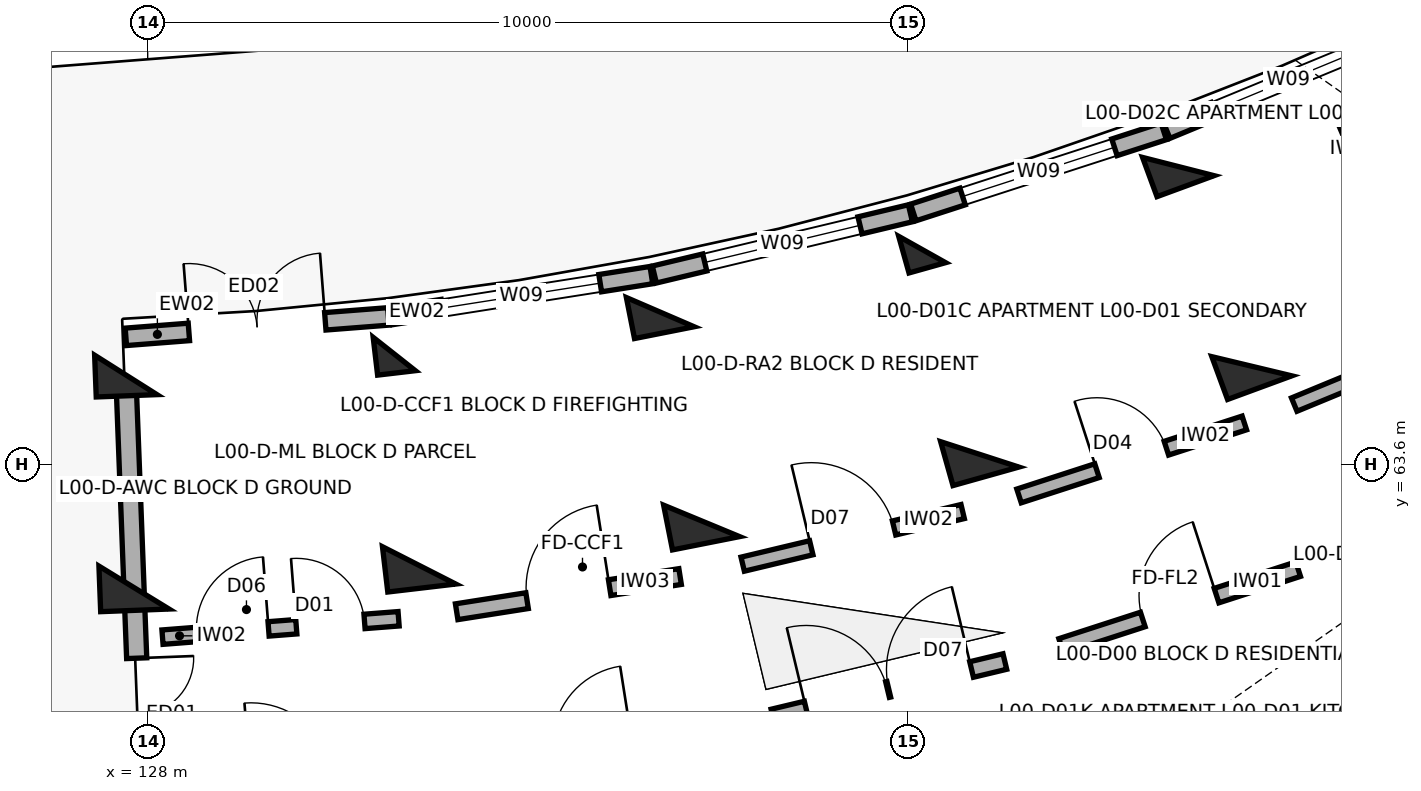
"""IFC4 building model, lengths in metres.
Left out: names, types, materials, properties, quantities, classifications, styles, units other than length and angle.
Written with IfcOpenShell. Run it as: python <this file> out.ifc"""

import sys

from ifc_helpers import new_model, si_unit, direction, frame, frame_2d, origin, origin_2d, place, context, subcontext, project, spatial, rectangle, extrude, element, fill, save


model = new_model("IFC4")
c1 = context("Model", 3, precision=1e-05, world=origin(), true_north=direction((0.0, 1.0)))
c2 = subcontext(c1, "Body", "Model", "MODEL_VIEW")
j1 = project(units=[si_unit("LENGTHUNIT", "METRE"), si_unit("PLANEANGLEUNIT", "RADIAN")], contexts=[c1])
p1 = place(None, origin())
s1 = spatial("IfcSite", under=j1, at=p1, CompositionType="ELEMENT")
p2 = place(p1, origin())
s2 = spatial("IfcBuilding", under=s1, at=p2, CompositionType="ELEMENT")
p3 = place(p2, origin())
s3 = spatial("IfcBuildingStorey", under=s2, at=p3, CompositionType="ELEMENT", Elevation=0.0)
p4 = place(p3, frame((127.712, 64.773, 0.0), z_axis=(0.0, 0.0, 1.0), x_axis=(0.038387809088, -0.999262916411, 0.0)))
e1 = element("IfcColumn", 1, at=p4, inside=s3, PredefinedType="COLUMN", context=c2, shape_type="SweptSolid", body=[
    extrude(rectangle(XDim=0.55, YDim=0.8, at=origin_2d()), origin(), (0.0, 0.0, 1.0), 4.5),
])
p5 = place(p3, frame((127.82, 61.975, 0.0), z_axis=(0.0, 0.0, 1.0), x_axis=(0.038387809088, -0.999262916411, 0.0)))
e2 = element("IfcColumn", 2, at=p5, inside=s3, PredefinedType="COLUMN", context=c2, shape_type="SweptSolid", body=[
    extrude(rectangle(XDim=0.6, YDim=0.9, at=origin_2d()), origin(), (0.0, 0.0, 1.0), 4.5),
])
p6 = place(p3, frame((131.244, 65.048, 0.0), z_axis=(0.0, 0.0, 1.0), x_axis=(0.116670737099, -0.993170649538, 0.0)))
e3 = element("IfcColumn", 3, at=p6, inside=s3, PredefinedType="COLUMN", context=c2, shape_type="SweptSolid", body=[
    extrude(rectangle(XDim=0.5, YDim=0.5, at=origin_2d()), origin(), (0.0, 0.0, 1.0), 4.5),
])
p7 = place(p3, frame((131.571, 62.267, 0.0), z_axis=(0.0, 0.0, 1.0), x_axis=(0.116670737099, -0.993170649538, 0.0)))
e4 = element("IfcColumn", 4, at=p7, inside=s3, PredefinedType="COLUMN", context=c2, shape_type="SweptSolid", body=[
    extrude(rectangle(XDim=0.6, YDim=0.9, at=origin_2d()), origin(), (0.0, 0.0, 1.0), 4.5),
])
p8 = place(p3, frame((134.744, 65.599, 0.0), z_axis=(0.0, 0.0, 1.0), x_axis=(0.19423435122, -0.980955155349, 0.0)))
e5 = element("IfcColumn", 5, at=p8, inside=s3, PredefinedType="COLUMN", context=c2, shape_type="SweptSolid", body=[
    extrude(rectangle(XDim=0.55, YDim=0.8, at=origin_2d()), origin(), (0.0, 0.0, 1.0), 4.5),
])
p9 = place(p3, frame((135.288, 62.853, 0.0), z_axis=(0.0, 0.0, 1.0), x_axis=(0.19423435122, -0.980955155349, 0.0)))
e6 = element("IfcColumn", 6, at=p9, inside=s3, PredefinedType="COLUMN", context=c2, shape_type="SweptSolid", body=[
    extrude(rectangle(XDim=0.6, YDim=0.9, at=origin_2d()), origin(), (0.0, 0.0, 1.0), 4.5),
])
p10 = place(p3, frame((138.189, 66.423, 0.0), z_axis=(0.0, 0.0, 1.0), x_axis=(0.270600445976, -0.962691746426, 0.0)))
e7 = element("IfcColumn", 7, at=p10, inside=s3, PredefinedType="COLUMN", context=c2, shape_type="SweptSolid", body=[
    extrude(rectangle(XDim=0.5, YDim=0.5, at=origin_2d()), origin(), (0.0, 0.0, 1.0), 4.5),
])
p11 = place(p3, frame((138.947, 63.728, 0.0), z_axis=(0.0, 0.0, 1.0), x_axis=(0.270600445976, -0.962691746426, 0.0)))
e8 = element("IfcColumn", 8, at=p11, inside=s3, PredefinedType="COLUMN", context=c2, shape_type="SweptSolid", body=[
    extrude(rectangle(XDim=0.6, YDim=0.9, at=origin_2d()), origin(), (0.0, 0.0, 1.0), 4.5),
])
p12 = place(p3, frame((141.56, 67.515, 0.0), z_axis=(0.0, 0.0, 1.0), x_axis=(0.345298198999, -0.93849302276, 0.0)))
e9 = element("IfcColumn", 9, at=p12, inside=s3, PredefinedType="COLUMN", context=c2, shape_type="SweptSolid", body=[
    extrude(rectangle(XDim=0.55, YDim=0.8, at=origin_2d()), origin(), (0.0, 0.0, 1.0), 4.5),
])
p13 = place(p3, frame((142.527, 64.887, 0.0), z_axis=(0.0, 0.0, 1.0), x_axis=(0.345298198999, -0.93849302276, 0.0)))
e10 = element("IfcColumn", 10, at=p13, inside=s3, PredefinedType="COLUMN", context=c2, shape_type="SweptSolid", body=[
    extrude(rectangle(XDim=0.6, YDim=0.9, at=origin_2d()), origin(), (0.0, 0.0, 1.0), 4.5),
])
p14 = place(p3, frame((127.713, 65.274, 0.0), z_axis=(0.0, 0.0, 1.0), x_axis=(0.99698399587, 0.07760742219, 0.0)))
e11 = element("IfcWall", 11, at=p14, inside=s3, PredefinedType="SOLIDWALL", context=c2, shape_type="SweptSolid", body=[
    extrude(rectangle(XDim=3.464, YDim=0.23, at=frame_2d((1.732, 0.0))), origin(), (0.0, 0.0, 1.0), 3.45),
])
p15 = place(p14, frame((0.832, 0.0, 0.0)))
e12 = element("IfcOpeningElement", 12, at=p15, cuts=e11, PredefinedType="OPENING", context=c2, shape_type="SweptSolid", body=[
    extrude(rectangle(XDim=1.8, YDim=2.3, at=frame_2d((0.9, 1.15))), frame((0.0, 0.125, 0.0), z_axis=(0.0, -1.0, 0.0), x_axis=(1.0, 0.0, 0.0)), (0.0, 0.0, 1.0), 0.25),
])
p16 = place(p3, frame((131.206, 65.548, 0.0), z_axis=(0.0, 0.0, 1.0), x_axis=(0.987825183084, 0.155568016203, 0.0)))
e13 = element("IfcWall", 13, at=p16, inside=s3, PredefinedType="SOLIDWALL", context=c2, shape_type="SweptSolid", body=[
    extrude(rectangle(XDim=3.464, YDim=0.23, at=frame_2d((1.732, 0.0))), origin(), (0.0, 0.0, 1.0), 3.45),
])
p17 = place(p16, frame((0.682, 0.0, 0.32)))
e14 = element("IfcOpeningElement", 14, at=p17, cuts=e13, PredefinedType="OPENING", context=c2, shape_type="SweptSolid", body=[
    extrude(rectangle(XDim=2.1, YDim=1.65, at=frame_2d((1.05, 0.825))), frame((0.0, 0.125, 0.0), z_axis=(0.0, -1.0, 0.0), x_axis=(1.0, 0.0, 0.0)), (0.0, 0.0, 1.0), 0.25),
])
p18 = place(p3, frame((134.666, 66.094, 0.0), z_axis=(0.0, 0.0, 1.0), x_axis=(0.972567451803, 0.232621047398, 0.0)))
e15 = element("IfcWall", 15, at=p18, inside=s3, PredefinedType="SOLIDWALL", context=c2, shape_type="SweptSolid", body=[
    extrude(rectangle(XDim=3.463, YDim=0.23, at=frame_2d((1.732, 0.0))), origin(), (0.0, 0.0, 1.0), 3.45),
])
p19 = place(p18, frame((0.682, 0.0, 0.32)))
e16 = element("IfcOpeningElement", 16, at=p19, cuts=e15, PredefinedType="OPENING", context=c2, shape_type="SweptSolid", body=[
    extrude(rectangle(XDim=2.1, YDim=1.65, at=frame_2d((1.05, 0.825))), frame((0.0, 0.125, 0.0), z_axis=(0.0, -1.0, 0.0), x_axis=(1.0, 0.0, 0.0)), (0.0, 0.0, 1.0), 0.25),
])
p20 = place(p3, frame((138.073, 66.911, 0.0), z_axis=(0.0, 0.0, 1.0), x_axis=(0.951327869213, 0.308180604935, 0.0)))
e17 = element("IfcWall", 17, at=p20, inside=s3, PredefinedType="SOLIDWALL", context=c2, shape_type="SweptSolid", body=[
    extrude(rectangle(XDim=3.463, YDim=0.23, at=frame_2d((1.732, 0.0))), origin(), (0.0, 0.0, 1.0), 3.45),
])
p21 = place(p20, frame((0.682, 0.0, 0.32)))
e18 = element("IfcOpeningElement", 18, at=p21, cuts=e17, PredefinedType="OPENING", context=c2, shape_type="SweptSolid", body=[
    extrude(rectangle(XDim=2.1, YDim=1.65, at=frame_2d((1.05, 0.825))), frame((0.0, 0.125, 0.0), z_axis=(0.0, -1.0, 0.0), x_axis=(1.0, 0.0, 0.0)), (0.0, 0.0, 1.0), 0.25),
])
p22 = place(p3, frame((141.406, 67.992, 0.0), z_axis=(0.0, 0.0, 1.0), x_axis=(0.924221949388, 0.381855716561, 0.0)))
e19 = element("IfcWall", 19, at=p22, inside=s3, PredefinedType="SOLIDWALL", context=c2, shape_type="SweptSolid", body=[
    extrude(rectangle(XDim=3.463, YDim=0.23, at=frame_2d((1.732, 0.0))), origin(), (0.0, 0.0, 1.0), 3.45),
])
p23 = place(p22, frame((0.682, 0.0, 0.32)))
e20 = element("IfcOpeningElement", 20, at=p23, cuts=e19, PredefinedType="OPENING", context=c2, shape_type="SweptSolid", body=[
    extrude(rectangle(XDim=2.1, YDim=1.65, at=frame_2d((1.05, 0.825))), frame((0.0, 0.125, 0.0), z_axis=(0.0, -1.0, 0.0), x_axis=(1.0, 0.0, 0.0)), (0.0, 0.0, 1.0), 0.25),
])
p24 = place(p3, frame((127.721, 64.533, 0.0), z_axis=(0.0, 0.0, 1.0), x_axis=(0.038407966241, -0.999262141847, 0.0)))
e21 = element("IfcWall", 21, at=p24, inside=s3, PredefinedType="SOLIDWALL", context=c2, shape_type="SweptSolid", body=[
    extrude(rectangle(XDim=8.2, YDim=0.265, at=frame_2d((4.1, 0.0))), origin(), (0.0, 0.0, 1.0), 3.34),
])
p25 = place(p24, frame((3.49, 0.0, 0.0)))
e22 = element("IfcOpeningElement", 22, at=p25, cuts=e21, PredefinedType="OPENING", context=c2, shape_type="SweptSolid", body=[
    extrude(rectangle(XDim=1.5, YDim=2.2, at=frame_2d((0.75, 1.1))), frame((0.0, 0.142, 0.0), z_axis=(0.0, -1.0, 0.0), x_axis=(1.0, 0.0, 0.0)), (0.0, 0.0, 1.0), 0.285),
])
p26 = place(p3, frame((128.195, 61.323, 0.0), z_axis=(0.0, 0.0, 1.0), x_axis=(0.996987280187, 0.077565218655, 0.0)))
e23 = element("IfcWall", 23, at=p26, inside=s3, PredefinedType="SOLIDWALL", context=c2, shape_type="SweptSolid", body=[
    extrude(rectangle(XDim=3.116, YDim=0.19, at=frame_2d((1.558, 0.0))), origin(), (0.0, 0.0, 1.0), 3.34),
])
p27 = place(p26, frame((0.45, 0.0, 0.0)))
e24 = element("IfcOpeningElement", 24, at=p27, cuts=e23, PredefinedType="OPENING", context=c2, shape_type="SweptSolid", body=[
    extrude(rectangle(XDim=0.95, YDim=2.1, at=frame_2d((0.475, 1.05))), frame((0.0, 0.105, 0.0), z_axis=(0.0, -1.0, 0.0), x_axis=(1.0, 0.0, 0.0)), (0.0, 0.0, 1.0), 0.21),
])
p28 = place(p26, frame((1.766, 0.0, 0.0)))
e25 = element("IfcOpeningElement", 25, at=p28, cuts=e23, PredefinedType="OPENING", context=c2, shape_type="SweptSolid", body=[
    extrude(rectangle(XDim=0.9, YDim=2.1, at=frame_2d((0.45, 1.05))), frame((0.0, 0.105, 0.0), z_axis=(0.0, -1.0, 0.0), x_axis=(1.0, 0.0, 0.0)), (0.0, 0.0, 1.0), 0.21),
])
p29 = place(p3, frame((132.065, 61.657, 0.0), z_axis=(0.0, 0.0, 1.0), x_axis=(0.987816121487, 0.155625544594, 0.0)))
e26 = element("IfcWall", 26, at=p29, inside=s3, PredefinedType="SOLIDWALL", context=c2, shape_type="SweptSolid", body=[
    extrude(rectangle(XDim=2.976, YDim=0.21, at=frame_2d((1.488, 0.0))), origin(), (0.0, 0.0, 1.0), 3.34),
])
p30 = place(p29, frame((0.938, 0.0, 0.0)))
e27 = element("IfcOpeningElement", 27, at=p30, cuts=e26, PredefinedType="OPENING", context=c2, shape_type="SweptSolid", body=[
    extrude(rectangle(XDim=1.1, YDim=2.15, at=frame_2d((0.55, 1.075))), frame((0.0, 0.115, 0.0), z_axis=(0.0, -1.0, 0.0), x_axis=(1.0, 0.0, 0.0)), (0.0, 0.0, 1.0), 0.23),
])
p31 = place(p3, frame((136.227, 60.272, 0.0), z_axis=(0.0, 0.0, 1.0), x_axis=(0.972564346632, 0.232634029456, 0.0)))
e28 = element("IfcWall", 28, at=p31, inside=s3, PredefinedType="SOLIDWALL", context=c2, shape_type="SweptSolid", body=[
    extrude(rectangle(XDim=3.137, YDim=0.21, at=frame_2d((1.568, 0.0))), origin(), (0.0, 0.0, 1.0), 3.34),
])
p32 = place(p31, frame((0.45, 0.0, 0.0)))
e29 = element("IfcOpeningElement", 29, at=p32, cuts=e28, PredefinedType="OPENING", context=c2, shape_type="SweptSolid", body=[
    extrude(rectangle(XDim=1.1, YDim=2.15, at=frame_2d((0.55, 1.075))), frame((0.0, 0.115, 0.0), z_axis=(0.0, -1.0, 0.0), x_axis=(1.0, 0.0, 0.0)), (0.0, 0.0, 1.0), 0.23),
])
p33 = place(p31, frame((1.567, 0.0, 0.0)))
e30 = element("IfcOpeningElement", 30, at=p33, cuts=e28, PredefinedType="OPENING", context=c2, shape_type="SweptSolid", body=[
    extrude(rectangle(XDim=1.12, YDim=2.15, at=frame_2d((0.56, 1.075))), frame((0.0, 0.115, 0.0), z_axis=(0.0, -1.0, 0.0), x_axis=(1.0, 0.0, 0.0)), (0.0, 0.0, 1.0), 0.23),
])
p34 = place(p3, frame((135.828, 62.283, 0.0), z_axis=(0.0, 0.0, 1.0), x_axis=(0.972558314217, 0.232659247501, 0.0)))
e31 = element("IfcWall", 31, at=p34, inside=s3, PredefinedType="SOLIDWALL", context=c2, shape_type="SweptSolid", body=[
    extrude(rectangle(XDim=2.976, YDim=0.19, at=frame_2d((1.488, 0.0))), origin(), (0.0, 0.0, 1.0), 3.34),
])
p35 = place(p34, frame((0.928, 0.0, 0.0)))
e32 = element("IfcOpeningElement", 32, at=p35, cuts=e31, PredefinedType="OPENING", context=c2, shape_type="SweptSolid", body=[
    extrude(rectangle(XDim=1.12, YDim=2.15, at=frame_2d((0.56, 1.075))), frame((0.0, 0.105, 0.0), z_axis=(0.0, -1.0, 0.0), x_axis=(1.0, 0.0, 0.0)), (0.0, 0.0, 1.0), 0.21),
])
p36 = place(p3, frame((140.019, 61.208, 0.0), z_axis=(0.0, 0.0, 1.0), x_axis=(0.951323803878, 0.308193154005, 0.0)))
e33 = element("IfcWall", 33, at=p36, inside=s3, PredefinedType="SOLIDWALL", context=c2, shape_type="SweptSolid", body=[
    extrude(rectangle(XDim=3.277, YDim=0.2, at=frame_2d((1.639, 0.0))), origin(), (0.0, 0.0, 1.0), 3.34),
])
p37 = place(p36, frame((1.128, 0.0, 0.0)))
e34 = element("IfcOpeningElement", 34, at=p37, cuts=e33, PredefinedType="OPENING", context=c2, shape_type="SweptSolid", body=[
    extrude(rectangle(XDim=1.02, YDim=2.15, at=frame_2d((0.51, 1.075))), frame((0.0, 0.11, 0.0), z_axis=(0.0, -1.0, 0.0), x_axis=(1.0, 0.0, 0.0)), (0.0, 0.0, 1.0), 0.22),
])
p38 = place(p3, frame((139.464, 63.181, 0.0), z_axis=(0.0, 0.0, 1.0), x_axis=(0.951336474448, 0.308154040027, 0.0)))
e35 = element("IfcWall", 35, at=p38, inside=s3, PredefinedType="SOLIDWALL", context=c2, shape_type="SweptSolid", body=[
    extrude(rectangle(XDim=3.116, YDim=0.19, at=frame_2d((1.558, 0.0))), origin(), (0.0, 0.0, 1.0), 3.34),
])
p39 = place(p38, frame((1.078, 0.0, 0.0)))
e36 = element("IfcOpeningElement", 36, at=p39, cuts=e35, PredefinedType="OPENING", context=c2, shape_type="SweptSolid", body=[
    extrude(rectangle(XDim=0.96, YDim=2.1, at=frame_2d((0.48, 1.05))), frame((0.0, 0.105, 0.0), z_axis=(0.0, -1.0, 0.0), x_axis=(1.0, 0.0, 0.0)), (0.0, 0.0, 1.0), 0.21),
])
p40 = place(p3, frame((143.085, 64.383, 0.0), z_axis=(0.0, 0.0, 1.0), x_axis=(0.924213340202, 0.381876553081, 0.0)))
e37 = element("IfcWall", 37, at=p40, inside=s3, PredefinedType="SOLIDWALL", context=c2, shape_type="SweptSolid", body=[
    extrude(rectangle(XDim=3.116, YDim=0.19, at=frame_2d((1.558, 0.0))), origin(), (0.0, 0.0, 1.0), 3.34),
])
p41 = place(p40, frame((1.108, 0.0, 0.0)))
e38 = element("IfcOpeningElement", 38, at=p41, cuts=e37, PredefinedType="OPENING", context=c2, shape_type="SweptSolid", body=[
    extrude(rectangle(XDim=0.9, YDim=2.1, at=frame_2d((0.45, 1.05))), frame((0.0, 0.105, 0.0), z_axis=(0.0, -1.0, 0.0), x_axis=(1.0, 0.0, 0.0)), (0.0, 0.0, 1.0), 0.21),
])
p42 = place(p3, frame((143.643, 68.308, 0.0), z_axis=(0.0, 0.0, 1.0), x_axis=(0.391203300693, -0.920304285292, 0.0)))
e39 = element("IfcWall", 39, at=p42, inside=s3, PredefinedType="PARTITIONING", context=c2, shape_type="SweptSolid", body=[
    extrude(rectangle(XDim=3.3, YDim=0.145, at=frame_2d((1.65, 0.0))), origin(), (0.0, 0.0, 1.0), 3.34),
])
p43 = place(p42, frame((1.21, 0.0, 0.0)))
e40 = element("IfcOpeningElement", 40, at=p43, cuts=e39, PredefinedType="OPENING", context=c2, shape_type="SweptSolid", body=[
    extrude(rectangle(XDim=0.88, YDim=2.1, at=frame_2d((0.44, 1.05))), frame((0.0, 0.083, 0.0), z_axis=(0.0, -1.0, 0.0), x_axis=(1.0, 0.0, 0.0)), (0.0, 0.0, 1.0), 0.165),
])
p44 = place(p15, origin())
e41 = element("IfcDoor", 41, at=p44, inside=s3, OperationType="DOUBLE_DOOR_SINGLE_SWING", PredefinedType="DOOR", context=c2, shape_type="SweptSolid", body=[
    extrude(rectangle(XDim=1.8, YDim=2.3, at=frame_2d((0.9, 1.15))), frame((0.0, 0.025, 0.0), z_axis=(0.0, -1.0, 0.0), x_axis=(1.0, 0.0, 0.0)), (0.0, 0.0, 1.0), 0.05),
])
fill(e12, e41)
p45 = place(p17, origin())
e42 = element("IfcWindow", 42, at=p45, inside=s3, PartitioningType="TRIPLE_PANEL_VERTICAL", PredefinedType="WINDOW", context=c2, shape_type="SweptSolid", body=[
    extrude(rectangle(XDim=2.1, YDim=1.65, at=frame_2d((1.05, 0.825))), frame((0.0, 0.03, 0.0), z_axis=(0.0, -1.0, 0.0), x_axis=(1.0, 0.0, 0.0)), (0.0, 0.0, 1.0), 0.06),
])
fill(e14, e42)
p46 = place(p19, origin())
e43 = element("IfcWindow", 43, at=p46, inside=s3, PartitioningType="TRIPLE_PANEL_VERTICAL", PredefinedType="WINDOW", context=c2, shape_type="SweptSolid", body=[
    extrude(rectangle(XDim=2.1, YDim=1.65, at=frame_2d((1.05, 0.825))), frame((0.0, 0.03, 0.0), z_axis=(0.0, -1.0, 0.0), x_axis=(1.0, 0.0, 0.0)), (0.0, 0.0, 1.0), 0.06),
])
fill(e16, e43)
p47 = place(p21, origin())
e44 = element("IfcWindow", 44, at=p47, inside=s3, PartitioningType="TRIPLE_PANEL_VERTICAL", PredefinedType="WINDOW", context=c2, shape_type="SweptSolid", body=[
    extrude(rectangle(XDim=2.1, YDim=1.65, at=frame_2d((1.05, 0.825))), frame((0.0, 0.03, 0.0), z_axis=(0.0, -1.0, 0.0), x_axis=(1.0, 0.0, 0.0)), (0.0, 0.0, 1.0), 0.06),
])
fill(e18, e44)
p48 = place(p23, origin())
e45 = element("IfcWindow", 45, at=p48, inside=s3, PartitioningType="TRIPLE_PANEL_VERTICAL", PredefinedType="WINDOW", context=c2, shape_type="SweptSolid", body=[
    extrude(rectangle(XDim=2.1, YDim=1.65, at=frame_2d((1.05, 0.825))), frame((0.0, 0.03, 0.0), z_axis=(0.0, -1.0, 0.0), x_axis=(1.0, 0.0, 0.0)), (0.0, 0.0, 1.0), 0.06),
])
fill(e20, e45)
p49 = place(p25, origin())
e46 = element("IfcDoor", 46, at=p49, inside=s3, OperationType="DOUBLE_DOOR_SINGLE_SWING", PredefinedType="DOOR", context=c2, shape_type="SweptSolid", body=[
    extrude(rectangle(XDim=1.5, YDim=2.2, at=frame_2d((0.75, 1.1))), frame((0.0, 0.025, 0.0), z_axis=(0.0, -1.0, 0.0), x_axis=(1.0, 0.0, 0.0)), (0.0, 0.0, 1.0), 0.05),
])
fill(e22, e46)
p50 = place(p27, origin())
e47 = element("IfcDoor", 47, at=p50, inside=s3, OperationType="SINGLE_SWING_RIGHT", PredefinedType="DOOR", context=c2, shape_type="SweptSolid", body=[
    extrude(rectangle(XDim=0.95, YDim=2.1, at=frame_2d((0.475, 1.05))), frame((0.0, 0.025, 0.0), z_axis=(0.0, -1.0, 0.0), x_axis=(1.0, 0.0, 0.0)), (0.0, 0.0, 1.0), 0.05),
])
fill(e24, e47)
p51 = place(p28, origin())
e48 = element("IfcDoor", 48, at=p51, inside=s3, OperationType="SINGLE_SWING_LEFT", PredefinedType="DOOR", context=c2, shape_type="SweptSolid", body=[
    extrude(rectangle(XDim=0.9, YDim=2.1, at=frame_2d((0.45, 1.05))), frame((0.0, 0.025, 0.0), z_axis=(0.0, -1.0, 0.0), x_axis=(1.0, 0.0, 0.0)), (0.0, 0.0, 1.0), 0.05),
])
fill(e25, e48)
p52 = place(p30, origin())
e49 = element("IfcDoor", 49, at=p52, inside=s3, OperationType="SINGLE_SWING_RIGHT", PredefinedType="DOOR", context=c2, shape_type="SweptSolid", body=[
    extrude(rectangle(XDim=1.1, YDim=2.15, at=frame_2d((0.55, 1.075))), frame((0.0, 0.025, 0.0), z_axis=(0.0, -1.0, 0.0), x_axis=(1.0, 0.0, 0.0)), (0.0, 0.0, 1.0), 0.05),
])
fill(e27, e49)
p53 = place(p32, origin())
e50 = element("IfcDoor", 50, at=p53, inside=s3, OperationType="SINGLE_SWING_LEFT", PredefinedType="DOOR", context=c2, shape_type="SweptSolid", body=[
    extrude(rectangle(XDim=1.1, YDim=2.15, at=frame_2d((0.55, 1.075))), frame((0.0, 0.025, 0.0), z_axis=(0.0, -1.0, 0.0), x_axis=(1.0, 0.0, 0.0)), (0.0, 0.0, 1.0), 0.05),
])
fill(e29, e50)
p54 = place(p33, origin())
e51 = element("IfcDoor", 51, at=p54, inside=s3, OperationType="SINGLE_SWING_RIGHT", PredefinedType="DOOR", context=c2, shape_type="SweptSolid", body=[
    extrude(rectangle(XDim=1.12, YDim=2.15, at=frame_2d((0.56, 1.075))), frame((0.0, 0.025, 0.0), z_axis=(0.0, -1.0, 0.0), x_axis=(1.0, 0.0, 0.0)), (0.0, 0.0, 1.0), 0.05),
])
fill(e30, e51)
p55 = place(p35, origin())
e52 = element("IfcDoor", 52, at=p55, inside=s3, OperationType="SINGLE_SWING_LEFT", PredefinedType="DOOR", context=c2, shape_type="SweptSolid", body=[
    extrude(rectangle(XDim=1.12, YDim=2.15, at=frame_2d((0.56, 1.075))), frame((0.0, 0.025, 0.0), z_axis=(0.0, -1.0, 0.0), x_axis=(1.0, 0.0, 0.0)), (0.0, 0.0, 1.0), 0.05),
])
fill(e32, e52)
p56 = place(p37, origin())
e53 = element("IfcDoor", 53, at=p56, inside=s3, OperationType="SINGLE_SWING_RIGHT", PredefinedType="DOOR", context=c2, shape_type="SweptSolid", body=[
    extrude(rectangle(XDim=1.02, YDim=2.15, at=frame_2d((0.51, 1.075))), frame((0.0, 0.025, 0.0), z_axis=(0.0, -1.0, 0.0), x_axis=(1.0, 0.0, 0.0)), (0.0, 0.0, 1.0), 0.05),
])
fill(e34, e53)
p57 = place(p39, origin())
e54 = element("IfcDoor", 54, at=p57, inside=s3, OperationType="SINGLE_SWING_LEFT", PredefinedType="DOOR", context=c2, shape_type="SweptSolid", body=[
    extrude(rectangle(XDim=0.96, YDim=2.1, at=frame_2d((0.48, 1.05))), frame((0.0, 0.025, 0.0), z_axis=(0.0, -1.0, 0.0), x_axis=(1.0, 0.0, 0.0)), (0.0, 0.0, 1.0), 0.05),
])
fill(e36, e54)
save(model, sys.argv[1])
